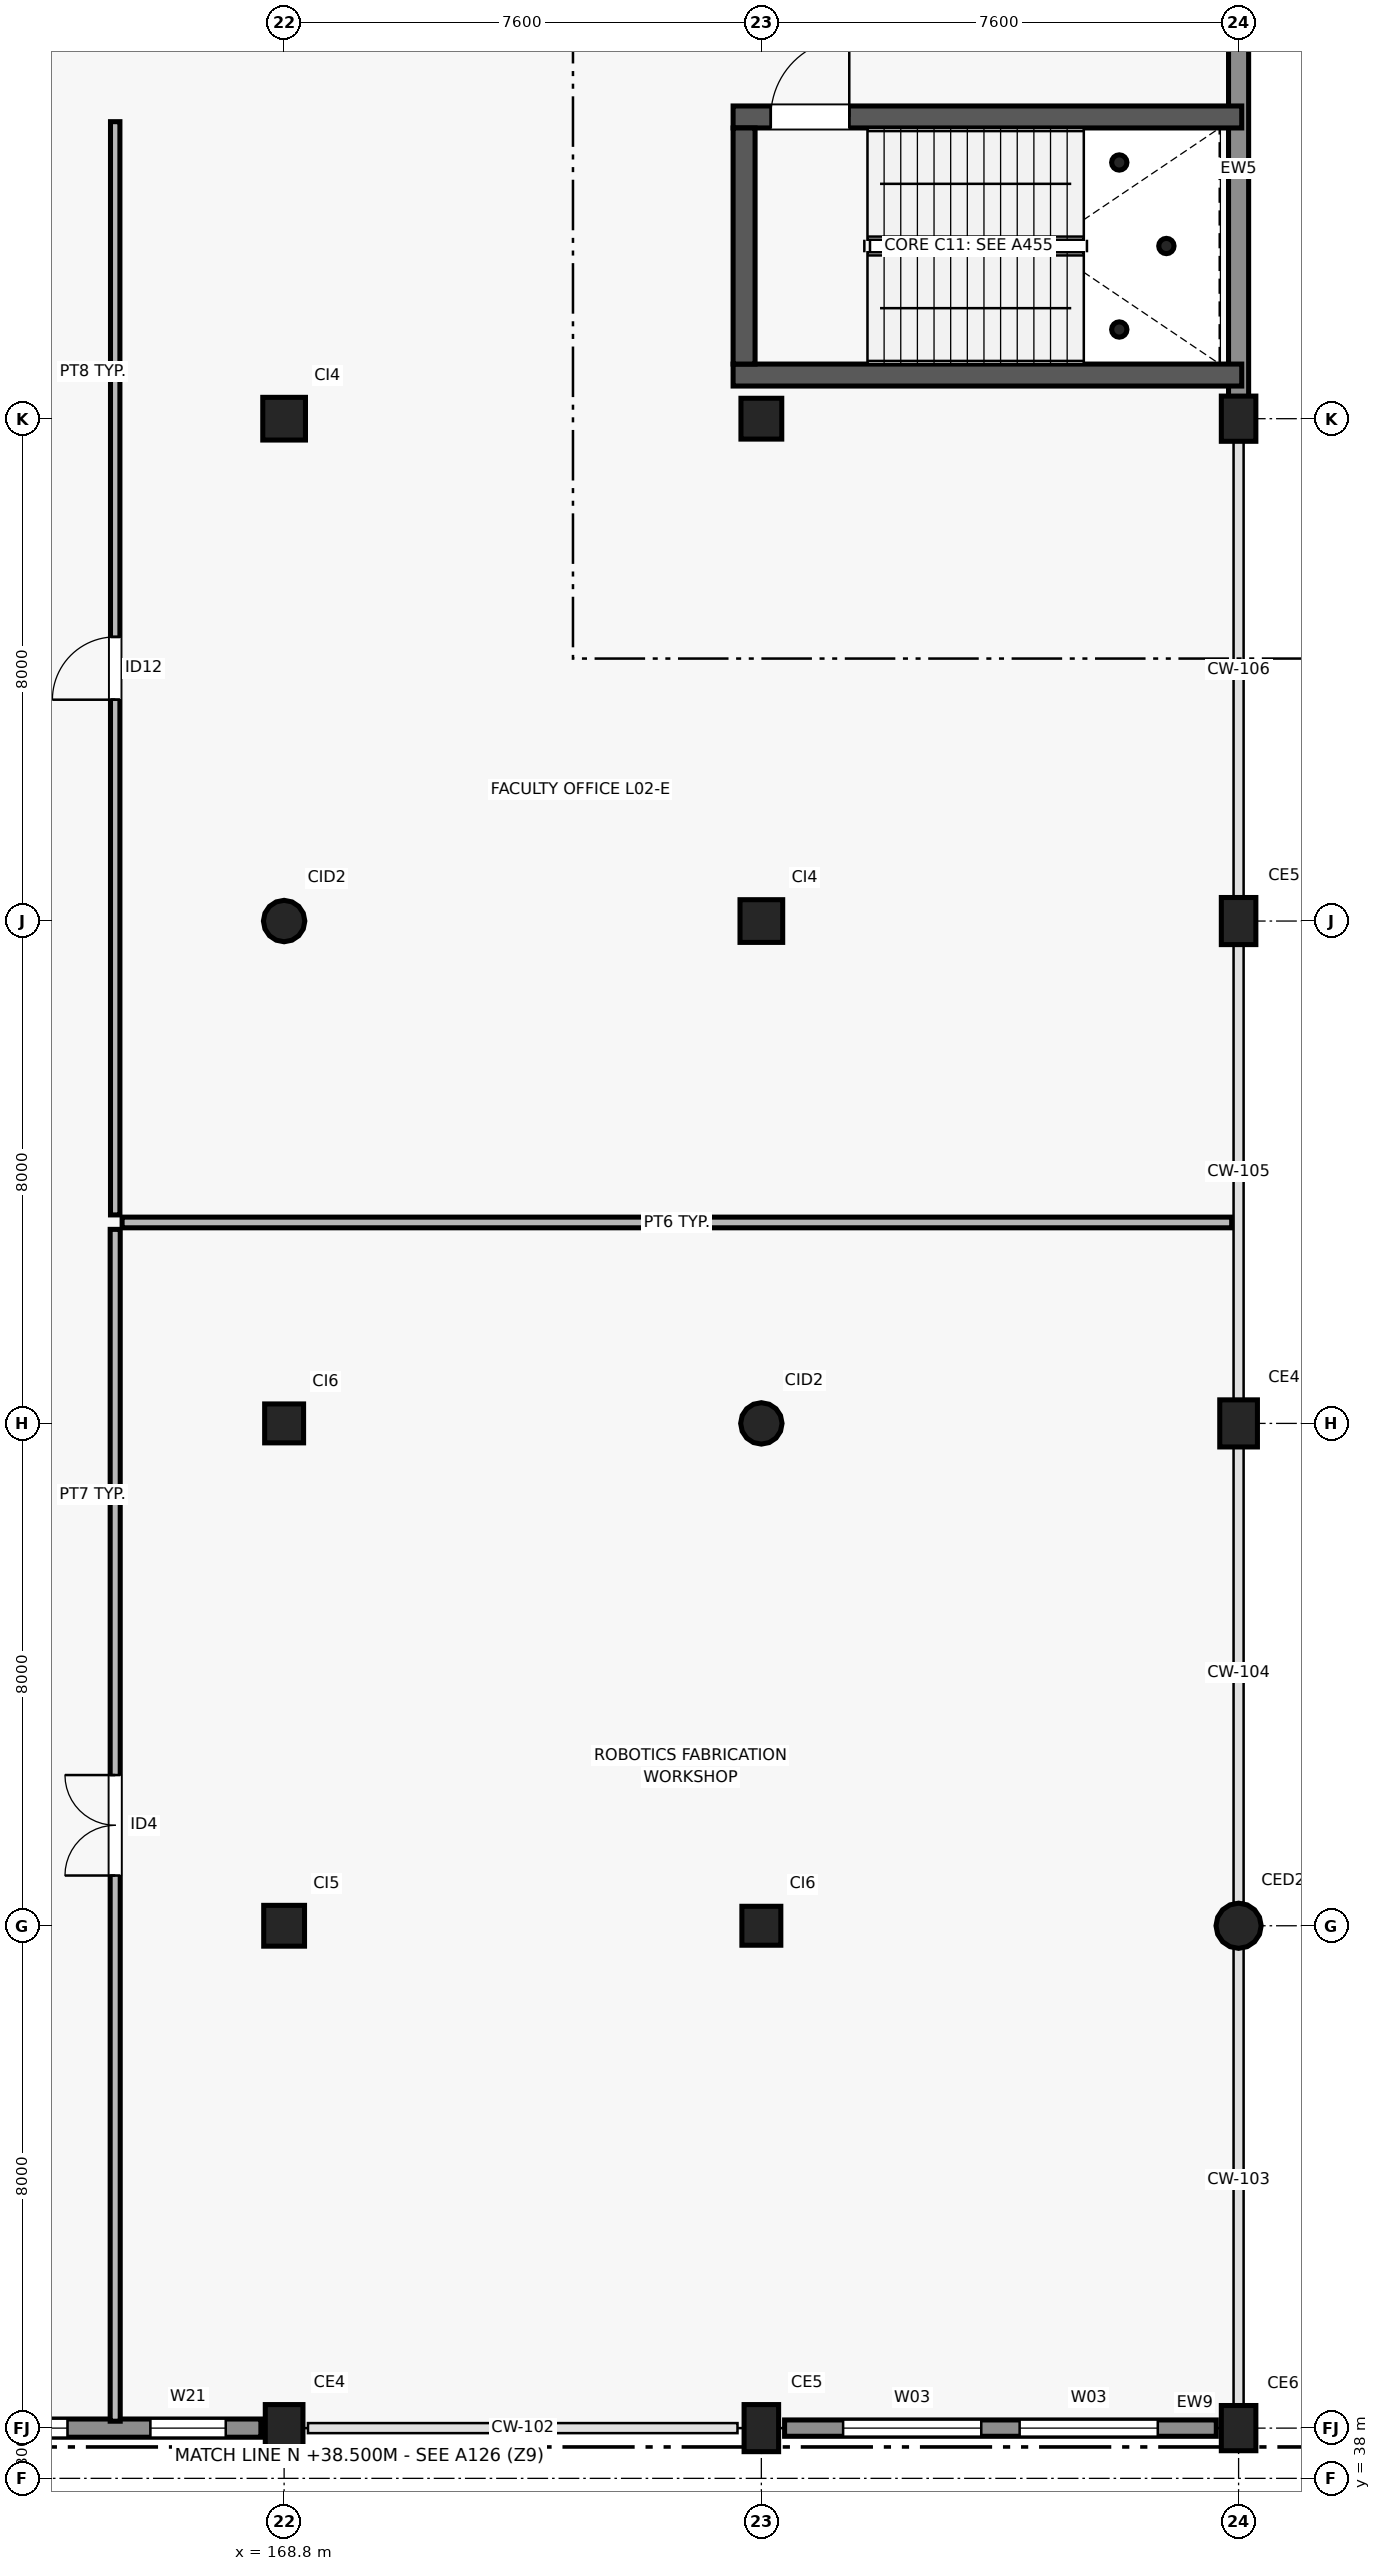
"""IFC4 building model, lengths in metres.
Left out: names, types, materials, properties, quantities, classifications, styles, units other than length and angle.
Written with IfcOpenShell. Run it as: python <this file> out.ifc"""

import sys

from ifc_helpers import new_model, si_unit, direction, frame, frame_2d, origin, origin_2d, place, context, subcontext, project, spatial, rectangle, circle, hollow_circle, extrude, element, fill, save


model = new_model("IFC4")
c1 = context("Model", 3, precision=1e-05, world=origin(), true_north=direction((0.0, 1.0)))
c2 = subcontext(c1, "Body", "Model", "MODEL_VIEW")
j1 = project(units=[si_unit("LENGTHUNIT", "METRE"), si_unit("PLANEANGLEUNIT", "RADIAN")], contexts=[c1])
p1 = place(None, origin())
s1 = spatial("IfcSite", under=j1, at=p1, CompositionType="ELEMENT")
p2 = place(p1, origin())
s2 = spatial("IfcBuilding", under=s1, at=p2, CompositionType="ELEMENT")
p3 = place(p2, frame((0.0, 0.0, 9.0)))
s3 = spatial("IfcBuildingStorey", under=s2, at=p3, CompositionType="ELEMENT", Elevation=9.0)
p4 = place(p3, frame((168.8, 38.8, 0.0), z_axis=(0.0, 0.0, 1.0), x_axis=(1.0, 0.0, 0.0)))
e1 = element("IfcColumn", 1, at=p4, inside=s3, PredefinedType="COLUMN", context=c2, shape_type="SweptSolid", body=[
    extrude(rectangle(XDim=0.75, YDim=0.6, at=origin_2d()), origin(), (0.0, 0.0, 1.0), 4.2),
])
p5 = place(p3, frame((168.8, 46.8, 0.0), z_axis=(0.0, 0.0, 1.0), x_axis=(1.0, 0.0, 0.0)))
e2 = element("IfcColumn", 2, at=p5, inside=s3, PredefinedType="COLUMN", context=c2, shape_type="SweptSolid", body=[
    extrude(rectangle(XDim=0.65, YDim=0.65, at=origin_2d()), origin(), (0.0, 0.0, 1.0), 4.2),
])
p6 = place(p3, frame((168.8, 54.8, 0.0), z_axis=(0.0, 0.0, 1.0), x_axis=(1.0, 0.0, 0.0)))
e3 = element("IfcColumn", 3, at=p6, inside=s3, PredefinedType="COLUMN", context=c2, shape_type="SweptSolid", body=[
    extrude(rectangle(XDim=0.62, YDim=0.62, at=origin_2d()), origin(), (0.0, 0.0, 1.0), 4.2),
])
p7 = place(p3, frame((168.8, 62.8, 0.0), z_axis=(0.0, 0.0, 1.0), x_axis=(1.0, 0.0, 0.0)))
e4 = element("IfcColumn", 4, at=p7, inside=s3, PredefinedType="COLUMN", context=c2, shape_type="SweptSolid", body=[
    extrude(circle(Radius=0.33, at=origin_2d()), origin(), (0.0, 0.0, 1.0), 4.2),
])
p8 = place(p3, frame((168.8, 70.8, 0.0), z_axis=(0.0, 0.0, 1.0), x_axis=(1.0, 0.0, 0.0)))
e5 = element("IfcColumn", 5, at=p8, inside=s3, PredefinedType="COLUMN", context=c2, shape_type="SweptSolid", body=[
    extrude(rectangle(XDim=0.68, YDim=0.68, at=origin_2d()), origin(), (0.0, 0.0, 1.0), 4.2),
])
p9 = place(p3, frame((176.4, 38.8, 0.0), z_axis=(0.0, 0.0, 1.0), x_axis=(1.0, 0.0, 0.0)))
e6 = element("IfcColumn", 6, at=p9, inside=s3, PredefinedType="COLUMN", context=c2, shape_type="SweptSolid", body=[
    extrude(rectangle(XDim=0.75, YDim=0.55, at=origin_2d()), origin(), (0.0, 0.0, 1.0), 4.2),
])
p10 = place(p3, frame((176.4, 46.8, 0.0), z_axis=(0.0, 0.0, 1.0), x_axis=(1.0, 0.0, 0.0)))
e7 = element("IfcColumn", 7, at=p10, inside=s3, PredefinedType="COLUMN", context=c2, shape_type="SweptSolid", body=[
    extrude(rectangle(XDim=0.62, YDim=0.62, at=origin_2d()), origin(), (0.0, 0.0, 1.0), 4.2),
])
p11 = place(p3, frame((176.4, 54.8, 0.0), z_axis=(0.0, 0.0, 1.0), x_axis=(1.0, 0.0, 0.0)))
e8 = element("IfcColumn", 8, at=p11, inside=s3, PredefinedType="COLUMN", context=c2, shape_type="SweptSolid", body=[
    extrude(circle(Radius=0.33, at=origin_2d()), origin(), (0.0, 0.0, 1.0), 4.2),
])
p12 = place(p3, frame((176.4, 62.8, 0.0), z_axis=(0.0, 0.0, 1.0), x_axis=(1.0, 0.0, 0.0)))
e9 = element("IfcColumn", 9, at=p12, inside=s3, PredefinedType="COLUMN", context=c2, shape_type="SweptSolid", body=[
    extrude(rectangle(XDim=0.68, YDim=0.68, at=origin_2d()), origin(), (0.0, 0.0, 1.0), 4.2),
])
p13 = place(p3, frame((176.4, 70.8, 0.0), z_axis=(0.0, 0.0, 1.0), x_axis=(1.0, 0.0, 0.0)))
e10 = element("IfcColumn", 10, at=p13, inside=s3, PredefinedType="COLUMN", context=c2, shape_type="SweptSolid", body=[
    extrude(rectangle(XDim=0.65, YDim=0.65, at=origin_2d()), origin(), (0.0, 0.0, 1.0), 4.2),
])
p14 = place(p3, frame((184.0, 38.8, 0.0), z_axis=(0.0, 0.0, 1.0), x_axis=(1.0, 0.0, 0.0)))
e11 = element("IfcColumn", 11, at=p14, inside=s3, PredefinedType="COLUMN", context=c2, shape_type="SweptSolid", body=[
    extrude(rectangle(XDim=0.72, YDim=0.55, at=origin_2d()), origin(), (0.0, 0.0, 1.0), 4.2),
])
p15 = place(p3, frame((184.0, 46.8, 0.0), z_axis=(0.0, 0.0, 1.0), x_axis=(1.0, 0.0, 0.0)))
e12 = element("IfcColumn", 12, at=p15, inside=s3, PredefinedType="COLUMN", context=c2, shape_type="SweptSolid", body=[
    extrude(circle(Radius=0.36, at=origin_2d()), origin(), (0.0, 0.0, 1.0), 4.2),
])
p16 = place(p3, frame((184.0, 54.8, 0.0), z_axis=(0.0, 0.0, 1.0), x_axis=(1.0, 0.0, 0.0)))
e13 = element("IfcColumn", 13, at=p16, inside=s3, PredefinedType="COLUMN", context=c2, shape_type="SweptSolid", body=[
    extrude(rectangle(XDim=0.75, YDim=0.6, at=origin_2d()), origin(), (0.0, 0.0, 1.0), 4.2),
])
p17 = place(p3, frame((184.0, 62.8, 0.0), z_axis=(0.0, 0.0, 1.0), x_axis=(1.0, 0.0, 0.0)))
e14 = element("IfcColumn", 14, at=p17, inside=s3, PredefinedType="COLUMN", context=c2, shape_type="SweptSolid", body=[
    extrude(rectangle(XDim=0.75, YDim=0.55, at=origin_2d()), origin(), (0.0, 0.0, 1.0), 4.2),
])
p18 = place(p3, frame((184.0, 70.8, 0.0), z_axis=(0.0, 0.0, 1.0), x_axis=(1.0, 0.0, 0.0)))
e15 = element("IfcColumn", 15, at=p18, inside=s3, PredefinedType="COLUMN", context=c2, shape_type="SweptSolid", body=[
    extrude(rectangle(XDim=0.72, YDim=0.55, at=origin_2d()), origin(), (0.0, 0.0, 1.0), 4.2),
])
p19 = place(p3, frame((161.102, 38.8, 0.0), z_axis=(0.0, 0.0, 1.0), x_axis=(1.0, 0.0, 0.0)))
e16 = element("IfcWall", 16, at=p19, inside=s3, PredefinedType="SOLIDWALL", context=c2, shape_type="SweptSolid", body=[
    extrude(rectangle(XDim=7.328, YDim=0.29, at=frame_2d((3.664, 0.0))), origin(), (0.0, 0.0, 1.0), 3.42),
])
p20 = place(p19, frame((0.569, 0.0, 0.9)))
e17 = element("IfcOpeningElement", 17, at=p20, cuts=e16, PredefinedType="OPENING", context=c2, shape_type="SweptSolid", body=[
    extrude(rectangle(XDim=0.95, YDim=1.25, at=frame_2d((0.475, 0.625))), frame((0.0, 0.155, 0.0), z_axis=(0.0, -1.0, 0.0), x_axis=(1.0, 0.0, 0.0)), (0.0, 0.0, 1.0), 0.31),
])
p21 = place(p19, frame((2.848, 0.0, 0.9)))
e18 = element("IfcOpeningElement", 18, at=p21, cuts=e16, PredefinedType="OPENING", context=c2, shape_type="SweptSolid", body=[
    extrude(rectangle(XDim=1.4, YDim=1.5, at=frame_2d((0.7, 0.75))), frame((0.0, 0.155, 0.0), z_axis=(0.0, -1.0, 0.0), x_axis=(1.0, 0.0, 0.0)), (0.0, 0.0, 1.0), 0.31),
])
p22 = place(p19, frame((5.568, 0.0, 0.9)))
e19 = element("IfcOpeningElement", 19, at=p22, cuts=e16, PredefinedType="OPENING", context=c2, shape_type="SweptSolid", body=[
    extrude(rectangle(XDim=1.2, YDim=1.25, at=frame_2d((0.6, 0.625))), frame((0.0, 0.155, 0.0), z_axis=(0.0, -1.0, 0.0), x_axis=(1.0, 0.0, 0.0)), (0.0, 0.0, 1.0), 0.31),
])
p23 = place(p3, frame((176.77, 38.8, 0.0), z_axis=(0.0, 0.0, 1.0), x_axis=(1.0, 0.0, 0.0)))
e20 = element("IfcWall", 20, at=p23, inside=s3, PredefinedType="SOLIDWALL", context=c2, shape_type="SweptSolid", body=[
    extrude(rectangle(XDim=6.875, YDim=0.26, at=frame_2d((3.438, 0.0))), origin(), (0.0, 0.0, 1.0), 3.27),
])
p24 = place(p23, frame((0.932, 0.0, 0.9)))
e21 = element("IfcOpeningElement", 21, at=p24, cuts=e20, PredefinedType="OPENING", context=c2, shape_type="SweptSolid", body=[
    extrude(rectangle(XDim=2.2, YDim=1.8, at=frame_2d((1.1, 0.9))), frame((0.0, 0.14, 0.0), z_axis=(0.0, -1.0, 0.0), x_axis=(1.0, 0.0, 0.0)), (0.0, 0.0, 1.0), 0.28),
])
p25 = place(p23, frame((3.743, 0.0, 0.9)))
e22 = element("IfcOpeningElement", 22, at=p25, cuts=e20, PredefinedType="OPENING", context=c2, shape_type="SweptSolid", body=[
    extrude(rectangle(XDim=2.2, YDim=1.8, at=frame_2d((1.1, 0.9))), frame((0.0, 0.14, 0.0), z_axis=(0.0, -1.0, 0.0), x_axis=(1.0, 0.0, 0.0)), (0.0, 0.0, 1.0), 0.28),
])
p26 = place(p3, frame((184.0, 71.07, 0.0), z_axis=(0.0, 0.0, 1.0), x_axis=(0.0, 1.0, 0.0)))
e23 = element("IfcWall", 23, at=p26, inside=s3, PredefinedType="SOLIDWALL", context=c2, shape_type="SweptSolid", body=[
    extrude(rectangle(XDim=7.427, YDim=0.32, at=frame_2d((3.714, 0.0))), origin(), (0.0, 0.0, 1.0), 3.92),
])
for number, where, z_axis, x_axis in (
    (24, (182.1, 72.22, 0.0), (0.0, 0.0, 1.0), (1.0, 0.0, 0.0)),
    (25, (182.1, 74.88, 0.0), (0.0, 0.0, 1.0), (1.0, 0.0, 0.0)),
    (26, (182.85, 73.55, 0.0), (0.0, 0.0, 1.0), (1.0, 0.0, 0.0)),
):
    element("IfcColumn", number, at=place(p3, frame(where, z_axis=z_axis, x_axis=x_axis)), inside=s3, PredefinedType="COLUMN", context=c2, shape_type="SweptSolid", body=[
        extrude(hollow_circle(Radius=0.122, WallThickness=0.01, at=origin_2d()), origin(), (0.0, 0.0, 1.0), 4.2),
    ])
p27 = place(p3, frame((175.95, 71.495, 0.0), z_axis=(0.0, 0.0, 1.0), x_axis=(1.0, 0.0, 0.0)))
e27 = element("IfcWall", 27, at=p27, inside=s3, PredefinedType="SHEAR", context=c2, shape_type="SweptSolid", body=[
    extrude(rectangle(XDim=8.1, YDim=0.35, at=frame_2d((4.05, 0.0))), origin(), (0.0, 0.0, 1.0), 3.92),
])
p28 = place(p3, frame((175.95, 75.605, 0.0), z_axis=(0.0, 0.0, 1.0), x_axis=(1.0, 0.0, 0.0)))
e28 = element("IfcWall", 28, at=p28, inside=s3, PredefinedType="SHEAR", context=c2, shape_type="SweptSolid", body=[
    extrude(rectangle(XDim=8.1, YDim=0.35, at=frame_2d((4.05, 0.0))), origin(), (0.0, 0.0, 1.0), 3.92),
])
p29 = place(p28, frame((0.6, 0.0, 0.0)))
e29 = element("IfcOpeningElement", 29, at=p29, cuts=e28, PredefinedType="OPENING", context=c2, shape_type="SweptSolid", body=[
    extrude(rectangle(XDim=1.25, YDim=2.2, at=frame_2d((0.625, 1.1))), frame((0.0, 0.185, 0.0), z_axis=(0.0, -1.0, 0.0), x_axis=(1.0, 0.0, 0.0)), (0.0, 0.0, 1.0), 0.37),
])
p30 = place(p3, frame((176.125, 71.67, 0.0), z_axis=(0.0, 0.0, 1.0), x_axis=(0.0, 1.0, 0.0)))
e30 = element("IfcWall", 30, at=p30, inside=s3, PredefinedType="SHEAR", context=c2, shape_type="SweptSolid", body=[
    extrude(rectangle(XDim=3.76, YDim=0.35, at=frame_2d((1.88, 0.0))), origin(), (0.0, 0.0, 1.0), 3.92),
])
p31 = place(p3, frame((166.22, 58.0, 0.0), z_axis=(0.0, 0.0, 1.0), x_axis=(1.0, 0.0, 0.0)))
e31 = element("IfcWall", 31, at=p31, inside=s3, PredefinedType="PARTITIONING", context=c2, shape_type="SweptSolid", body=[
    extrude(rectangle(XDim=17.67, YDim=0.17, at=frame_2d((8.835, 0.0))), origin(), (0.0, 0.0, 1.0), 3.9),
])
p32 = place(p3, frame((166.11, 38.91, 0.0), z_axis=(0.0, 0.0, 1.0), x_axis=(0.0, 1.0, 0.0)))
e32 = element("IfcWall", 32, at=p32, inside=s3, PredefinedType="PARTITIONING", context=c2, shape_type="SweptSolid", body=[
    extrude(rectangle(XDim=18.98, YDim=0.16, at=frame_2d((9.49, 0.0))), origin(), (0.0, 0.0, 1.0), 3.9),
])
p33 = place(p32, frame((8.69, 0.0, 0.0)))
e33 = element("IfcOpeningElement", 33, at=p33, cuts=e32, PredefinedType="OPENING", context=c2, shape_type="SweptSolid", body=[
    extrude(rectangle(XDim=1.6, YDim=2.25, at=frame_2d((0.8, 1.125))), frame((0.0, 0.09, 0.0), z_axis=(0.0, -1.0, 0.0), x_axis=(1.0, 0.0, 0.0)), (0.0, 0.0, 1.0), 0.18),
])
p34 = place(p3, frame((166.11, 58.12, 0.0), z_axis=(0.0, 0.0, 1.0), x_axis=(0.0, 1.0, 0.0)))
e34 = element("IfcWall", 34, at=p34, inside=s3, PredefinedType="PARTITIONING", context=c2, shape_type="SweptSolid", body=[
    extrude(rectangle(XDim=17.41, YDim=0.15, at=frame_2d((8.705, 0.0))), origin(), (0.0, 0.0, 1.0), 3.9),
])
p35 = place(p34, frame((8.205, 0.0, 0.0)))
e35 = element("IfcOpeningElement", 35, at=p35, cuts=e34, PredefinedType="OPENING", context=c2, shape_type="SweptSolid", body=[
    extrude(rectangle(XDim=1.0, YDim=2.15, at=frame_2d((0.5, 1.075))), frame((0.0, 0.085, 0.0), z_axis=(0.0, -1.0, 0.0), x_axis=(1.0, 0.0, 0.0)), (0.0, 0.0, 1.0), 0.17),
])
p36 = place(p21, origin())
e36 = element("IfcWindow", 36, at=p36, inside=s3, PartitioningType="SINGLE_PANEL", PredefinedType="WINDOW", context=c2, shape_type="SweptSolid", body=[
    extrude(rectangle(XDim=1.4, YDim=1.5, at=frame_2d((0.7, 0.75))), frame((0.0, 0.03, 0.0), z_axis=(0.0, -1.0, 0.0), x_axis=(1.0, 0.0, 0.0)), (0.0, 0.0, 1.0), 0.06),
])
fill(e18, e36)
p37 = place(p22, origin())
e37 = element("IfcWindow", 37, at=p37, inside=s3, PartitioningType="SINGLE_PANEL", PredefinedType="WINDOW", context=c2, shape_type="SweptSolid", body=[
    extrude(rectangle(XDim=1.2, YDim=1.25, at=frame_2d((0.6, 0.625))), frame((0.0, 0.03, 0.0), z_axis=(0.0, -1.0, 0.0), x_axis=(1.0, 0.0, 0.0)), (0.0, 0.0, 1.0), 0.06),
])
fill(e19, e37)
p38 = place(p24, origin())
e38 = element("IfcWindow", 38, at=p38, inside=s3, PartitioningType="SINGLE_PANEL", PredefinedType="WINDOW", context=c2, shape_type="SweptSolid", body=[
    extrude(rectangle(XDim=2.2, YDim=1.8, at=frame_2d((1.1, 0.9))), frame((0.0, 0.03, 0.0), z_axis=(0.0, -1.0, 0.0), x_axis=(1.0, 0.0, 0.0)), (0.0, 0.0, 1.0), 0.06),
])
fill(e21, e38)
p39 = place(p25, origin())
e39 = element("IfcWindow", 39, at=p39, inside=s3, PartitioningType="SINGLE_PANEL", PredefinedType="WINDOW", context=c2, shape_type="SweptSolid", body=[
    extrude(rectangle(XDim=2.2, YDim=1.8, at=frame_2d((1.1, 0.9))), frame((0.0, 0.03, 0.0), z_axis=(0.0, -1.0, 0.0), x_axis=(1.0, 0.0, 0.0)), (0.0, 0.0, 1.0), 0.06),
])
fill(e22, e39)
p40 = place(p29, origin())
e40 = element("IfcDoor", 40, at=p40, inside=s3, OperationType="SINGLE_SWING_RIGHT", PredefinedType="DOOR", context=c2, shape_type="SweptSolid", body=[
    extrude(rectangle(XDim=1.25, YDim=2.2, at=frame_2d((0.625, 1.1))), frame((0.0, 0.025, 0.0), z_axis=(0.0, -1.0, 0.0), x_axis=(1.0, 0.0, 0.0)), (0.0, 0.0, 1.0), 0.05),
])
fill(e29, e40)
p41 = place(p33, origin())
e41 = element("IfcDoor", 41, at=p41, inside=s3, OperationType="DOUBLE_DOOR_SINGLE_SWING", PredefinedType="DOOR", context=c2, shape_type="SweptSolid", body=[
    extrude(rectangle(XDim=1.6, YDim=2.25, at=frame_2d((0.8, 1.125))), frame((0.0, 0.025, 0.0), z_axis=(0.0, -1.0, 0.0), x_axis=(1.0, 0.0, 0.0)), (0.0, 0.0, 1.0), 0.05),
])
fill(e33, e41)
p42 = place(p35, origin())
e42 = element("IfcDoor", 42, at=p42, inside=s3, OperationType="SINGLE_SWING_LEFT", PredefinedType="DOOR", context=c2, shape_type="SweptSolid", body=[
    extrude(rectangle(XDim=1.0, YDim=2.15, at=frame_2d((0.5, 1.075))), frame((0.0, 0.025, 0.0), z_axis=(0.0, -1.0, 0.0), x_axis=(1.0, 0.0, 0.0)), (0.0, 0.0, 1.0), 0.05),
])
fill(e35, e42)
save(model, sys.argv[1])
